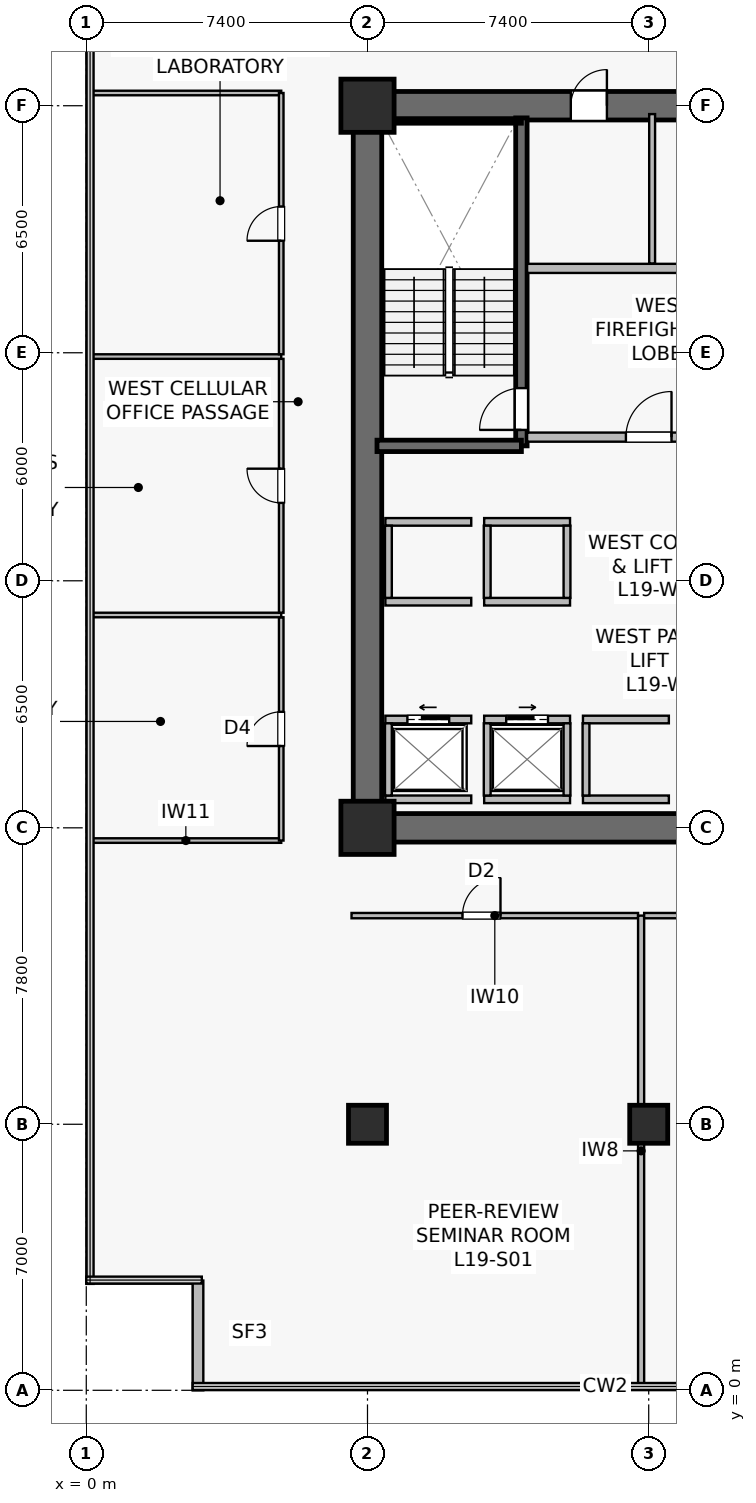
"""IFC4 building model, lengths in metres.
Left out: names, types, materials, properties, quantities, classifications, styles, units other than length and angle.
Written with IfcOpenShell. Run it as: python <this file> out.ifc"""

import sys

from ifc_helpers import new_model, si_unit, direction, frame, frame_2d, origin, origin_2d, place, context, subcontext, project, spatial, rectangle, extrude, source, transform, mapped, element, fill, save


model = new_model("IFC4")
c1 = context("Model", 3, precision=1e-05, world=origin(), true_north=direction((0.0, 1.0)))
c2 = subcontext(c1, "Body", "Model", "MODEL_VIEW")
j1 = project(units=[si_unit("LENGTHUNIT", "METRE"), si_unit("PLANEANGLEUNIT", "RADIAN")], contexts=[c1])
p1 = place(None, origin())
s1 = spatial("IfcSite", under=j1, at=p1, CompositionType="ELEMENT")
p2 = place(p1, origin())
s2 = spatial("IfcBuilding", under=s1, at=p2, CompositionType="ELEMENT")
p3 = place(p2, frame((0.0, 0.0, 78.5)))
s3 = spatial("IfcBuildingStorey", under=s2, at=p3, CompositionType="ELEMENT", Elevation=78.5)
p4 = place(p3, frame((7.025, 14.8, 0.0), z_axis=(0.0, 0.0, 1.0), x_axis=(1.0, 0.0, 0.0)))
e1 = element("IfcWall", 1, at=p4, inside=s3, PredefinedType="SHEAR", context=c2, shape_type="SweptSolid", body=[
    extrude(rectangle(XDim=15.55, YDim=0.75, at=frame_2d((7.775, 0.0))), origin(), (0.0, 0.0, 1.0), 3.78),
])
p5 = place(p3, frame((7.025, 33.8, 0.0), z_axis=(0.0, 0.0, 1.0), x_axis=(1.0, 0.0, 0.0)))
e2 = element("IfcWall", 2, at=p5, inside=s3, PredefinedType="SHEAR", context=c2, shape_type="SweptSolid", body=[
    extrude(rectangle(XDim=15.55, YDim=0.75, at=frame_2d((7.775, 0.0))), origin(), (0.0, 0.0, 1.0), 3.78),
])
p6 = place(p5, frame((5.725, 0.0, 0.0)))
e3 = element("IfcOpeningElement", 3, at=p6, cuts=e2, PredefinedType="OPENING", context=c2, shape_type="SweptSolid", body=[
    extrude(rectangle(XDim=0.95, YDim=2.15, at=frame_2d((0.475, 1.075))), frame((0.0, 0.385, 0.0), z_axis=(0.0, -1.0, 0.0), x_axis=(1.0, 0.0, 0.0)), (0.0, 0.0, 1.0), 0.77),
])
p7 = place(p5, frame((9.09, 0.0, 0.0)))
e4 = element("IfcOpeningElement", 4, at=p7, cuts=e2, PredefinedType="OPENING", context=c2, shape_type="SweptSolid", body=[
    extrude(rectangle(XDim=0.95, YDim=2.15, at=frame_2d((0.475, 1.075))), frame((0.0, 0.385, 0.0), z_axis=(0.0, -1.0, 0.0), x_axis=(1.0, 0.0, 0.0)), (0.0, 0.0, 1.0), 0.77),
])
p8 = place(p5, frame((12.49, 0.0, 0.0)))
e5 = element("IfcOpeningElement", 5, at=p8, cuts=e2, PredefinedType="OPENING", context=c2, shape_type="SweptSolid", body=[
    extrude(rectangle(XDim=0.95, YDim=2.15, at=frame_2d((0.475, 1.075))), frame((0.0, 0.385, 0.0), z_axis=(0.0, -1.0, 0.0), x_axis=(1.0, 0.0, 0.0)), (0.0, 0.0, 1.0), 0.77),
])
p9 = place(p3, frame((7.4, 15.175, 0.0), z_axis=(0.0, 0.0, 1.0), x_axis=(0.0, 1.0, 0.0)))
e6 = element("IfcWall", 6, at=p9, inside=s3, PredefinedType="SHEAR", context=c2, shape_type="SweptSolid", body=[
    extrude(rectangle(XDim=18.25, YDim=0.75, at=frame_2d((9.125, 0.0))), origin(), (0.0, 0.0, 1.0), 3.78),
])
p10 = place(p3, frame((11.45, 24.85, 0.0), z_axis=(0.0, 0.0, 1.0), x_axis=(0.0, 1.0, 0.0)))
e7 = element("IfcWall", 7, at=p10, inside=s3, PredefinedType="SHEAR", context=c2, shape_type="SweptSolid", body=[
    extrude(rectangle(XDim=8.63, YDim=0.3, at=frame_2d((4.315, 0.0))), origin(), (0.0, 0.0, 1.0), 3.78),
])
p11 = place(p10, frame((0.42, 0.0, 0.0)))
e8 = element("IfcOpeningElement", 8, at=p11, cuts=e7, PredefinedType="OPENING", context=c2, shape_type="SweptSolid", body=[
    extrude(rectangle(XDim=1.1, YDim=2.15, at=frame_2d((0.55, 1.075))), frame((0.0, 0.16, 0.0), z_axis=(0.0, -1.0, 0.0), x_axis=(1.0, 0.0, 0.0)), (0.0, 0.0, 1.0), 0.32),
])
p12 = place(p3, frame((7.65, 24.85, 0.0), z_axis=(0.0, 0.0, 1.0), x_axis=(1.0, 0.0, 0.0)))
e9 = element("IfcWall", 9, at=p12, inside=s3, PredefinedType="SHEAR", context=c2, shape_type="SweptSolid", body=[
    extrude(rectangle(XDim=3.8, YDim=0.3, at=frame_2d((1.9, 0.0))), origin(), (0.0, 0.0, 1.0), 3.78),
])
p13 = place(p3, frame((7.73, 33.4, 0.0), z_axis=(0.0, 0.0, 1.0), x_axis=(1.0, 0.0, 0.0)))
e10 = element("IfcWall", 10, at=p13, inside=s3, PredefinedType="SOLIDWALL", context=c2, shape_type="SweptSolid", body=[
    extrude(rectangle(XDim=3.72, YDim=0.12, at=frame_2d((1.86, 0.0))), origin(), (0.0, 0.0, 1.0), 3.78),
])
m1 = source(origin(), c2, "Body", "SweptSolid", [
    extrude(rectangle(XDim=1.0, YDim=1.0, at=origin_2d()), origin(), (0.0, 0.0, 1.0), 4.1),
])
p14 = place(p3, frame((14.8, 7.0, 0.0), z_axis=(0.0, 0.0, 1.0), x_axis=(1.0, 0.0, 0.0)))
e11 = element("IfcColumn", 11, at=p14, inside=s3, PredefinedType="COLUMN", context=c2, shape_type="MappedRepresentation", body=[
    mapped(m1, transform((0.0, 0.0, 0.0), scale=1.0)),
])
m2 = source(origin(), c2, "Body", "SweptSolid", [
    extrude(rectangle(XDim=1.4, YDim=1.4, at=origin_2d()), origin(), (0.0, 0.0, 1.0), 4.1),
])
for number, where, z_axis, x_axis in (
    (12, (7.4, 14.8, 0.0), (0.0, 0.0, 1.0), (1.0, 0.0, 0.0)),
    (13, (7.4, 33.8, 0.0), (0.0, 0.0, 1.0), (1.0, 0.0, 0.0)),
):
    element("IfcColumn", number, at=place(p3, frame(where, z_axis=z_axis, x_axis=x_axis)), inside=s3, PredefinedType="COLUMN", context=c2, shape_type="MappedRepresentation", body=[
        mapped(m2, transform((0.0, 0.0, 0.0), scale=1.0)),
    ])
p15 = place(p3, frame((7.4, 7.0, 0.0), z_axis=(0.0, 0.0, 1.0), x_axis=(1.0, 0.0, 0.0)))
e14 = element("IfcColumn", 14, at=p15, inside=s3, PredefinedType="COLUMN", context=c2, shape_type="MappedRepresentation", body=[
    mapped(m1, transform((0.0, 0.0, 0.0), scale=1.0)),
])
p16 = place(p3, frame((2.94, 2.888, 0.0), z_axis=(0.0, 0.0, 1.0), x_axis=(0.0, -1.0, 0.0)))
e15 = element("IfcWall", 15, at=p16, inside=s3, PredefinedType="STANDARD", context=c2, shape_type="SweptSolid", body=[
    extrude(rectangle(XDim=2.888, YDim=0.28, at=frame_2d((1.444, 0.0))), origin(), (0.0, 0.0, 1.0), 3.78),
])
p17 = place(p3, frame((11.6, 25.08, 0.0), z_axis=(0.0, 0.0, 1.0), x_axis=(1.0, 0.0, 0.0)))
e16 = element("IfcWall", 16, at=p17, inside=s3, PredefinedType="SOLIDWALL", context=c2, shape_type="SweptSolid", body=[
    extrude(rectangle(XDim=6.92, YDim=0.24, at=frame_2d((3.46, 0.0))), origin(), (0.0, 0.0, 1.0), 3.115),
])
p18 = place(p17, frame((2.6, 0.0, 0.0)))
e17 = element("IfcOpeningElement", 17, at=p18, cuts=e16, PredefinedType="OPENING", context=c2, shape_type="SweptSolid", body=[
    extrude(rectangle(XDim=1.2, YDim=2.16, at=frame_2d((0.6, 1.08))), frame((0.0, 0.13, 0.0), z_axis=(0.0, -1.0, 0.0), x_axis=(1.0, 0.0, 0.0)), (0.0, 0.0, 1.0), 0.26),
])
p19 = place(p3, frame((11.6, 29.52, 0.0), z_axis=(0.0, 0.0, 1.0), x_axis=(1.0, 0.0, 0.0)))
e18 = element("IfcWall", 18, at=p19, inside=s3, PredefinedType="SOLIDWALL", context=c2, shape_type="SweptSolid", body=[
    extrude(rectangle(XDim=6.92, YDim=0.24, at=frame_2d((3.46, 0.0))), origin(), (0.0, 0.0, 1.0), 3.115),
])
p20 = place(p3, frame((7.87, 17.65, 0.0), z_axis=(0.0, 0.0, 1.0), x_axis=(1.0, 0.0, 0.0)))
e19 = element("IfcWall", 19, at=p20, inside=s3, PredefinedType="SOLIDWALL", context=c2, shape_type="SweptSolid", body=[
    extrude(rectangle(XDim=2.26, YDim=0.2, at=frame_2d((1.13, 0.0))), origin(), (0.0, 0.0, 1.0), 3.78),
])
p21 = place(p20, frame((0.58, 0.0, 0.0)))
e20 = element("IfcOpeningElement", 20, at=p21, cuts=e19, PredefinedType="OPENING", context=c2, shape_type="SweptSolid", body=[
    extrude(rectangle(XDim=1.1, YDim=2.22, at=frame_2d((0.55, 1.11))), frame((0.0, 0.11, 0.0), z_axis=(0.0, -1.0, 0.0), x_axis=(1.0, 0.0, 0.0)), (0.0, 0.0, 1.0), 0.22),
])
p22 = place(p3, frame((7.87, 15.55, 0.0), z_axis=(0.0, 0.0, 1.0), x_axis=(1.0, 0.0, 0.0)))
e21 = element("IfcWall", 21, at=p22, inside=s3, PredefinedType="SOLIDWALL", context=c2, shape_type="SweptSolid", body=[
    extrude(rectangle(XDim=2.26, YDim=0.2, at=frame_2d((1.13, 0.0))), origin(), (0.0, 0.0, 1.0), 3.78),
])
p23 = place(p3, frame((7.95, 15.65, 0.0), z_axis=(0.0, 0.0, 1.0), x_axis=(0.0, 1.0, 0.0)))
e22 = element("IfcWall", 22, at=p23, inside=s3, PredefinedType="SOLIDWALL", context=c2, shape_type="SweptSolid", body=[
    extrude(rectangle(XDim=1.9, YDim=0.18, at=frame_2d((0.95, 0.0))), origin(), (0.0, 0.0, 1.0), 3.78),
])
p24 = place(p3, frame((10.47, 17.65, 0.0), z_axis=(0.0, 0.0, 1.0), x_axis=(1.0, 0.0, 0.0)))
e23 = element("IfcWall", 23, at=p24, inside=s3, PredefinedType="SOLIDWALL", context=c2, shape_type="SweptSolid", body=[
    extrude(rectangle(XDim=2.26, YDim=0.2, at=frame_2d((1.13, 0.0))), origin(), (0.0, 0.0, 1.0), 3.78),
])
p25 = place(p24, frame((0.58, 0.0, 0.0)))
e24 = element("IfcOpeningElement", 24, at=p25, cuts=e23, PredefinedType="OPENING", context=c2, shape_type="SweptSolid", body=[
    extrude(rectangle(XDim=1.1, YDim=2.22, at=frame_2d((0.55, 1.11))), frame((0.0, 0.11, 0.0), z_axis=(0.0, -1.0, 0.0), x_axis=(1.0, 0.0, 0.0)), (0.0, 0.0, 1.0), 0.22),
])
p26 = place(p3, frame((10.47, 15.55, 0.0), z_axis=(0.0, 0.0, 1.0), x_axis=(1.0, 0.0, 0.0)))
e25 = element("IfcWall", 25, at=p26, inside=s3, PredefinedType="SOLIDWALL", context=c2, shape_type="SweptSolid", body=[
    extrude(rectangle(XDim=2.26, YDim=0.2, at=frame_2d((1.13, 0.0))), origin(), (0.0, 0.0, 1.0), 3.78),
])
for number, where, z_axis, x_axis in (
    (26, (10.55, 15.65, 0.0), (0.0, 0.0, 1.0), (0.0, 1.0, 0.0)),
    (27, (12.65, 15.65, 0.0), (0.0, 0.0, 1.0), (0.0, 1.0, 0.0)),
):
    element("IfcWall", number, at=place(p3, frame(where, z_axis=z_axis, x_axis=x_axis)), inside=s3, PredefinedType="SOLIDWALL", context=c2, shape_type="SweptSolid", body=[
        extrude(rectangle(XDim=1.9, YDim=0.18, at=frame_2d((0.95, 0.0))), origin(), (0.0, 0.0, 1.0), 3.78),
    ])
for number, where, z_axis, x_axis in (
    (28, (13.07, 17.65, 0.0), (0.0, 0.0, 1.0), (1.0, 0.0, 0.0)),
    (29, (13.07, 15.55, 0.0), (0.0, 0.0, 1.0), (1.0, 0.0, 0.0)),
):
    element("IfcWall", number, at=place(p3, frame(where, z_axis=z_axis, x_axis=x_axis)), inside=s3, PredefinedType="SOLIDWALL", context=c2, shape_type="SweptSolid", body=[
        extrude(rectangle(XDim=2.26, YDim=0.2, at=frame_2d((1.13, 0.0))), origin(), (0.0, 0.0, 1.0), 3.115),
    ])
p27 = place(p3, frame((13.15, 15.65, 0.0), z_axis=(0.0, 0.0, 1.0), x_axis=(0.0, 1.0, 0.0)))
e30 = element("IfcWall", 30, at=p27, inside=s3, PredefinedType="SOLIDWALL", context=c2, shape_type="SweptSolid", body=[
    extrude(rectangle(XDim=1.9, YDim=0.18, at=frame_2d((0.95, 0.0))), origin(), (0.0, 0.0, 1.0), 3.78),
])
for number, where, z_axis, x_axis in (
    (31, (7.87, 20.75, 0.0), (0.0, 0.0, 1.0), (1.0, 0.0, 0.0)),
    (32, (7.87, 22.85, 0.0), (0.0, 0.0, 1.0), (1.0, 0.0, 0.0)),
):
    element("IfcWall", number, at=place(p3, frame(where, z_axis=z_axis, x_axis=x_axis)), inside=s3, PredefinedType="SOLIDWALL", context=c2, shape_type="SweptSolid", body=[
        extrude(rectangle(XDim=2.26, YDim=0.2, at=frame_2d((1.13, 0.0))), origin(), (0.0, 0.0, 1.0), 3.78),
    ])
p28 = place(p3, frame((7.95, 20.85, 0.0), z_axis=(0.0, 0.0, 1.0), x_axis=(0.0, 1.0, 0.0)))
e33 = element("IfcWall", 33, at=p28, inside=s3, PredefinedType="SOLIDWALL", context=c2, shape_type="SweptSolid", body=[
    extrude(rectangle(XDim=1.9, YDim=0.18, at=frame_2d((0.95, 0.0))), origin(), (0.0, 0.0, 1.0), 3.78),
])
for number, where, z_axis, x_axis in (
    (34, (10.47, 20.75, 0.0), (0.0, 0.0, 1.0), (1.0, 0.0, 0.0)),
    (35, (10.47, 22.85, 0.0), (0.0, 0.0, 1.0), (1.0, 0.0, 0.0)),
):
    element("IfcWall", number, at=place(p3, frame(where, z_axis=z_axis, x_axis=x_axis)), inside=s3, PredefinedType="SOLIDWALL", context=c2, shape_type="SweptSolid", body=[
        extrude(rectangle(XDim=2.26, YDim=0.2, at=frame_2d((1.13, 0.0))), origin(), (0.0, 0.0, 1.0), 3.78),
    ])
for number, where, z_axis, x_axis in (
    (36, (10.55, 20.85, 0.0), (0.0, 0.0, 1.0), (0.0, 1.0, 0.0)),
    (37, (12.65, 20.85, 0.0), (0.0, 0.0, 1.0), (0.0, 1.0, 0.0)),
):
    element("IfcWall", number, at=place(p3, frame(where, z_axis=z_axis, x_axis=x_axis)), inside=s3, PredefinedType="SOLIDWALL", context=c2, shape_type="SweptSolid", body=[
        extrude(rectangle(XDim=1.9, YDim=0.18, at=frame_2d((0.95, 0.0))), origin(), (0.0, 0.0, 1.0), 3.78),
    ])
p29 = place(p3, frame((14.89, 29.65, 0.0), z_axis=(0.0, 0.0, 1.0), x_axis=(0.0, 1.0, 0.0)))
e38 = element("IfcWall", 38, at=p29, inside=s3, PredefinedType="PLUMBINGWALL", context=c2, shape_type="SweptSolid", body=[
    extrude(rectangle(XDim=3.93, YDim=0.155, at=frame_2d((1.965, 0.0))), origin(), (0.0, 0.0, 1.0), 3.115),
])
p30 = place(p3, frame((6.98, 12.49, 0.0), z_axis=(0.0, 0.0, 1.0), x_axis=(1.0, 0.0, 0.0)))
e39 = element("IfcWall", 39, at=p30, inside=s3, PredefinedType="PARTITIONING", context=c2, shape_type="SweptSolid", body=[
    extrude(rectangle(XDim=7.54, YDim=0.14, at=frame_2d((3.77, 0.0))), origin(), (0.0, 0.0, 1.0), 3.265),
])
p31 = place(p30, frame((2.92, 0.0, 0.0)))
e40 = element("IfcOpeningElement", 40, at=p31, cuts=e39, PredefinedType="OPENING", context=c2, shape_type="SweptSolid", body=[
    extrude(rectangle(XDim=1.0, YDim=2.15, at=frame_2d((0.5, 1.075))), frame((0.0, 0.08, 0.0), z_axis=(0.0, -1.0, 0.0), x_axis=(1.0, 0.0, 0.0)), (0.0, 0.0, 1.0), 0.16),
])
p32 = place(p3, frame((14.6, 0.11, 0.0), z_axis=(0.0, 0.0, 1.0), x_axis=(0.0, 1.0, 0.0)))
e41 = element("IfcWall", 41, at=p32, inside=s3, PredefinedType="PARTITIONING", context=c2, shape_type="SweptSolid", body=[
    extrude(rectangle(XDim=12.38, YDim=0.16, at=frame_2d((6.19, 0.0))), origin(), (0.0, 0.0, 1.0), 3.015),
])
p33 = place(p3, frame((14.68, 12.49, 0.0), z_axis=(0.0, 0.0, 1.0), x_axis=(1.0, 0.0, 0.0)))
e42 = element("IfcWall", 42, at=p33, inside=s3, PredefinedType="PARTITIONING", context=c2, shape_type="SweptSolid", body=[
    extrude(rectangle(XDim=16.84, YDim=0.14, at=frame_2d((8.42, 0.0))), origin(), (0.0, 0.0, 1.0), 3.115),
])
p34 = place(p33, frame((8.772, 0.0, 0.0)))
e43 = element("IfcOpeningElement", 43, at=p34, cuts=e42, PredefinedType="OPENING", context=c2, shape_type="SweptSolid", body=[
    extrude(rectangle(XDim=1.1, YDim=2.18, at=frame_2d((0.55, 1.09))), frame((0.0, 0.08, 0.0), z_axis=(0.0, -1.0, 0.0), x_axis=(1.0, 0.0, 0.0)), (0.0, 0.0, 1.0), 0.16),
])
for number, where, z_axis, x_axis in (
    (44, (0.11, 14.465, 0.0), (0.0, 0.0, 1.0), (1.0, 0.0, 0.0)),
    (45, (0.11, 34.135, 0.0), (0.0, 0.0, 1.0), (1.0, 0.0, 0.0)),
):
    element("IfcWall", number, at=place(p3, frame(where, z_axis=z_axis, x_axis=x_axis)), inside=s3, PredefinedType="PARTITIONING", context=c2, shape_type="SweptSolid", body=[
        extrude(rectangle(XDim=5.02, YDim=0.12, at=frame_2d((2.51, 0.0))), origin(), (0.0, 0.0, 1.0), 3.78),
    ])
p35 = place(p3, frame((5.13, 14.465, 0.0), z_axis=(0.0, 0.0, 1.0), x_axis=(0.0, 1.0, 0.0)))
e46 = element("IfcWall", 46, at=p35, inside=s3, PredefinedType="PARTITIONING", context=c2, shape_type="SweptSolid", body=[
    extrude(rectangle(XDim=5.875, YDim=0.12, at=frame_2d((2.938, 0.0))), origin(), (0.0, 0.0, 1.0), 3.78),
])
p36 = place(p35, frame((2.488, 0.0, 0.0)))
e47 = element("IfcOpeningElement", 47, at=p36, cuts=e46, PredefinedType="OPENING", context=c2, shape_type="SweptSolid", body=[
    extrude(rectangle(XDim=0.9, YDim=2.1, at=frame_2d((0.45, 1.05))), frame((0.0, 0.07, 0.0), z_axis=(0.0, -1.0, 0.0), x_axis=(1.0, 0.0, 0.0)), (0.0, 0.0, 1.0), 0.14),
])
p37 = place(p3, frame((0.11, 20.4, 0.0), z_axis=(0.0, 0.0, 1.0), x_axis=(1.0, 0.0, 0.0)))
e48 = element("IfcWall", 48, at=p37, inside=s3, PredefinedType="PARTITIONING", context=c2, shape_type="SweptSolid", body=[
    extrude(rectangle(XDim=5.02, YDim=0.12, at=frame_2d((2.51, 0.0))), origin(), (0.0, 0.0, 1.0), 3.78),
])
p38 = place(p3, frame((5.13, 20.46, 0.0), z_axis=(0.0, 0.0, 1.0), x_axis=(0.0, 1.0, 0.0)))
e49 = element("IfcWall", 49, at=p38, inside=s3, PredefinedType="PARTITIONING", context=c2, shape_type="SweptSolid", body=[
    extrude(rectangle(XDim=6.68, YDim=0.12, at=frame_2d((3.34, 0.0))), origin(), (0.0, 0.0, 1.0), 3.78),
])
p39 = place(p38, frame((2.89, 0.0, 0.0)))
e50 = element("IfcOpeningElement", 50, at=p39, cuts=e49, PredefinedType="OPENING", context=c2, shape_type="SweptSolid", body=[
    extrude(rectangle(XDim=0.9, YDim=2.1, at=frame_2d((0.45, 1.05))), frame((0.0, 0.07, 0.0), z_axis=(0.0, -1.0, 0.0), x_axis=(1.0, 0.0, 0.0)), (0.0, 0.0, 1.0), 0.14),
])
p40 = place(p3, frame((0.11, 27.2, 0.0), z_axis=(0.0, 0.0, 1.0), x_axis=(1.0, 0.0, 0.0)))
e51 = element("IfcWall", 51, at=p40, inside=s3, PredefinedType="PARTITIONING", context=c2, shape_type="SweptSolid", body=[
    extrude(rectangle(XDim=5.02, YDim=0.12, at=frame_2d((2.51, 0.0))), origin(), (0.0, 0.0, 1.0), 3.78),
])
p41 = place(p3, frame((5.13, 27.26, 0.0), z_axis=(0.0, 0.0, 1.0), x_axis=(0.0, 1.0, 0.0)))
e52 = element("IfcWall", 52, at=p41, inside=s3, PredefinedType="PARTITIONING", context=c2, shape_type="SweptSolid", body=[
    extrude(rectangle(XDim=6.875, YDim=0.12, at=frame_2d((3.438, 0.0))), origin(), (0.0, 0.0, 1.0), 3.78),
])
p42 = place(p41, frame((2.988, 0.0, 0.0)))
e53 = element("IfcOpeningElement", 53, at=p42, cuts=e52, PredefinedType="OPENING", context=c2, shape_type="SweptSolid", body=[
    extrude(rectangle(XDim=0.9, YDim=2.1, at=frame_2d((0.45, 1.05))), frame((0.0, 0.07, 0.0), z_axis=(0.0, -1.0, 0.0), x_axis=(1.0, 0.0, 0.0)), (0.0, 0.0, 1.0), 0.14),
])
m3 = source(origin(), c2, "Body", "SweptSolid", [
    extrude(rectangle(XDim=1.1, YDim=2.15, at=frame_2d((0.55, 1.075))), frame((0.0, 0.025, 0.0), z_axis=(0.0, -1.0, 0.0), x_axis=(1.0, 0.0, 0.0)), (0.0, 0.0, 1.0), 0.05),
])
p43 = place(p11, origin())
e54 = element("IfcDoor", 54, at=p43, inside=s3, OperationType="SINGLE_SWING_LEFT", PredefinedType="DOOR", context=c2, shape_type="MappedRepresentation", body=[
    mapped(m3, transform((0.0, 0.0, 0.0), scale=1.0)),
])
fill(e8, e54)
m4 = source(origin(), c2, "Body", "SweptSolid", [
    extrude(rectangle(XDim=1.2, YDim=2.16, at=frame_2d((0.6, 1.08))), frame((0.0, 0.025, 0.0), z_axis=(0.0, -1.0, 0.0), x_axis=(1.0, 0.0, 0.0)), (0.0, 0.0, 1.0), 0.05),
])
p44 = place(p18, origin())
e55 = element("IfcDoor", 55, at=p44, inside=s3, OperationType="SINGLE_SWING_RIGHT", PredefinedType="DOOR", context=c2, shape_type="MappedRepresentation", body=[
    mapped(m4, transform((0.0, 0.0, 0.0), scale=1.0)),
])
fill(e17, e55)
m5 = source(origin(), c2, "Body", "SweptSolid", [
    extrude(rectangle(XDim=1.1, YDim=2.22, at=frame_2d((0.55, 1.11))), frame((0.0, 0.025, 0.0), z_axis=(0.0, -1.0, 0.0), x_axis=(1.0, 0.0, 0.0)), (0.0, 0.0, 1.0), 0.05),
])
p45 = place(p21, origin())
e56 = element("IfcDoor", 56, at=p45, inside=s3, OperationType="SLIDING_TO_LEFT", PredefinedType="USERDEFINED", context=c2, shape_type="MappedRepresentation", body=[
    mapped(m5, transform((0.0, 0.0, 0.0), scale=1.0)),
])
fill(e20, e56)
p46 = place(p25, origin())
e57 = element("IfcDoor", 57, at=p46, inside=s3, OperationType="SLIDING_TO_RIGHT", PredefinedType="USERDEFINED", context=c2, shape_type="MappedRepresentation", body=[
    mapped(m5, transform((0.0, 0.0, 0.0), scale=1.0)),
])
fill(e24, e57)
m6 = source(origin(), c2, "Body", "SweptSolid", [
    extrude(rectangle(XDim=0.95, YDim=2.15, at=frame_2d((0.475, 1.075))), frame((0.0, 0.025, 0.0), z_axis=(0.0, -1.0, 0.0), x_axis=(1.0, 0.0, 0.0)), (0.0, 0.0, 1.0), 0.05),
])
p47 = place(p6, origin())
e58 = element("IfcDoor", 58, at=p47, inside=s3, OperationType="SINGLE_SWING_RIGHT", PredefinedType="DOOR", context=c2, shape_type="MappedRepresentation", body=[
    mapped(m6, transform((0.0, 0.0, 0.0), scale=1.0)),
])
fill(e3, e58)
m7 = source(origin(), c2, "Body", "SweptSolid", [
    extrude(rectangle(XDim=1.0, YDim=2.15, at=frame_2d((0.5, 1.075))), frame((0.0, 0.025, 0.0), z_axis=(0.0, -1.0, 0.0), x_axis=(1.0, 0.0, 0.0)), (0.0, 0.0, 1.0), 0.05),
])
p48 = place(p31, origin())
e59 = element("IfcDoor", 59, at=p48, inside=s3, OperationType="SINGLE_SWING_RIGHT", PredefinedType="DOOR", context=c2, shape_type="MappedRepresentation", body=[
    mapped(m7, transform((0.0, 0.0, 0.0), scale=1.0)),
])
fill(e40, e59)
m8 = source(origin(), c2, "Body", "SweptSolid", [
    extrude(rectangle(XDim=0.9, YDim=2.1, at=frame_2d((0.45, 1.05))), frame((0.0, 0.025, 0.0), z_axis=(0.0, -1.0, 0.0), x_axis=(1.0, 0.0, 0.0)), (0.0, 0.0, 1.0), 0.05),
])
p49 = place(p36, origin())
e60 = element("IfcDoor", 60, at=p49, inside=s3, OperationType="SINGLE_SWING_LEFT", PredefinedType="DOOR", context=c2, shape_type="MappedRepresentation", body=[
    mapped(m8, transform((0.0, 0.0, 0.0), scale=1.0)),
])
fill(e47, e60)
p50 = place(p39, origin())
e61 = element("IfcDoor", 61, at=p50, inside=s3, OperationType="SINGLE_SWING_RIGHT", PredefinedType="DOOR", context=c2, shape_type="MappedRepresentation", body=[
    mapped(m8, transform((0.0, 0.0, 0.0), scale=1.0)),
])
fill(e50, e61)
p51 = place(p42, origin())
e62 = element("IfcDoor", 62, at=p51, inside=s3, OperationType="SINGLE_SWING_LEFT", PredefinedType="DOOR", context=c2, shape_type="MappedRepresentation", body=[
    mapped(m8, transform((0.0, 0.0, 0.0), scale=1.0)),
])
fill(e53, e62)
save(model, sys.argv[1])
